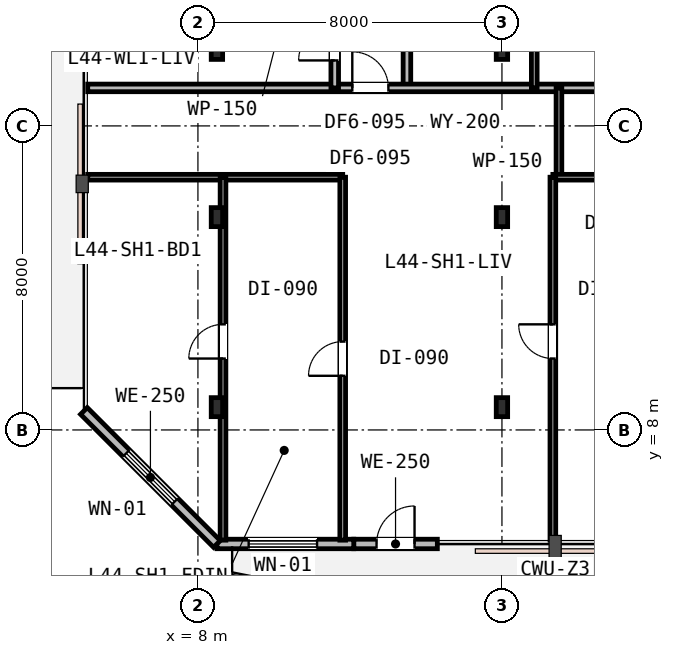
"""IFC4 building model, lengths in metres.
Left out: names, types, materials, properties, quantities, classifications, styles, units other than length and angle.
Written with IfcOpenShell. Run it as: python <this file> out.ifc"""

import sys

from ifc_helpers import new_model, si_unit, direction, frame, frame_2d, origin, origin_2d, place, context, subcontext, project, spatial, rectangle, i_section, extrude, element, fill, save


model = new_model("IFC4")
c1 = context("Model", 3, precision=1e-05, world=origin(), true_north=direction((0.0, 1.0)))
c2 = subcontext(c1, "Body", "Model", "MODEL_VIEW")
j1 = project(units=[si_unit("LENGTHUNIT", "METRE"), si_unit("PLANEANGLEUNIT", "RADIAN")], contexts=[c1])
p1 = place(None, origin())
s1 = spatial("IfcSite", under=j1, at=p1, CompositionType="ELEMENT")
p2 = place(p1, origin())
s2 = spatial("IfcBuilding", under=s1, at=p2, CompositionType="ELEMENT")
p3 = place(p2, frame((0.0, 0.0, 172.2)))
s3 = spatial("IfcBuildingStorey", under=s2, at=p3, CompositionType="ELEMENT", Elevation=172.2)
for number, where, z_axis, x_axis in (
    (1, (8.5, 8.6, 0.0), (0.0, 0.0, 1.0), (1.0, 0.0, 0.0)),
    (2, (16.0, 8.6, 0.0), (0.0, 0.0, 1.0), (1.0, 0.0, 0.0)),
    (3, (8.5, 13.6, 0.0), (0.0, 0.0, 1.0), (1.0, 0.0, 0.0)),
    (4, (16.0, 13.6, 0.0), (0.0, 0.0, 1.0), (1.0, 0.0, 0.0)),
    (5, (8.5, 18.0, 0.0), (0.0, 0.0, 1.0), (1.0, 0.0, 0.0)),
    (6, (16.0, 18.0, 0.0), (0.0, 0.0, 1.0), (1.0, 0.0, 0.0)),
):
    element("IfcColumn", number, at=place(p3, frame(where, z_axis=z_axis, x_axis=x_axis)), inside=s3, PredefinedType="COLUMN", context=c2, shape_type="SweptSolid", body=[
        extrude(i_section(OverallWidth=0.3, OverallDepth=0.5, WebThickness=0.015, FlangeThickness=0.028, FilletRadius=0.027, at=origin_2d()), origin(), (0.0, 0.0, 1.0), 3.6),
    ])
p4 = place(p3, frame((12.1, 5.0, 0.0), z_axis=(0.0, 0.0, 1.0), x_axis=(1.0, 0.0, 0.0)))
e7 = element("IfcWall", 7, at=p4, inside=s3, PredefinedType="STANDARD", context=c2, shape_type="SweptSolid", body=[
    extrude(rectangle(XDim=2.2, YDim=0.25, at=frame_2d((1.1, 0.0))), origin(), (0.0, 0.0, 1.0), 3.33),
])
p5 = place(p4, frame((0.6, 0.0, 0.0)))
e8 = element("IfcOpeningElement", 8, at=p5, cuts=e7, PredefinedType="OPENING", context=c2, shape_type="SweptSolid", body=[
    extrude(rectangle(XDim=1.0, YDim=2.15, at=frame_2d((0.5, 1.075))), frame((0.0, 0.135, 0.0), z_axis=(0.0, -1.0, 0.0), x_axis=(1.0, 0.0, 0.0)), (0.0, 0.0, 1.0), 0.27),
])
p6 = place(p3, frame((8.5, 5.0, 0.0), z_axis=(0.0, 0.0, 1.0), x_axis=(1.0, 0.0, 0.0)))
e9 = element("IfcWall", 9, at=p6, inside=s3, PredefinedType="STANDARD", context=c2, shape_type="SweptSolid", body=[
    extrude(rectangle(XDim=3.6, YDim=0.25, at=frame_2d((1.8, 0.0))), origin(), (0.0, 0.0, 1.0), 3.33),
])
p7 = place(p6, frame((0.835, 0.0, 0.75)))
e10 = element("IfcOpeningElement", 10, at=p7, cuts=e9, PredefinedType="OPENING", context=c2, shape_type="SweptSolid", body=[
    extrude(rectangle(XDim=1.8, YDim=1.85, at=frame_2d((0.9, 0.925))), frame((0.0, 0.135, 0.0), z_axis=(0.0, -1.0, 0.0), x_axis=(1.0, 0.0, 0.0)), (0.0, 0.0, 1.0), 0.27),
])
p8 = place(p3, frame((5.0, 8.5, 0.0), z_axis=(0.0, 0.0, 1.0), x_axis=(0.707106781187, -0.707106781187, 0.0)))
e11 = element("IfcWall", 11, at=p8, inside=s3, PredefinedType="STANDARD", context=c2, shape_type="SweptSolid", body=[
    extrude(rectangle(XDim=4.95, YDim=0.25, at=frame_2d((2.475, 0.0))), origin(), (0.0, 0.0, 1.0), 3.33),
])
p9 = place(p8, frame((1.575, 0.0, 0.75)))
e12 = element("IfcOpeningElement", 12, at=p9, cuts=e11, PredefinedType="OPENING", context=c2, shape_type="SweptSolid", body=[
    extrude(rectangle(XDim=1.8, YDim=1.85, at=frame_2d((0.9, 0.925))), frame((0.0, 0.135, 0.0), z_axis=(0.0, -1.0, 0.0), x_axis=(1.0, 0.0, 0.0)), (0.0, 0.0, 1.0), 0.27),
])
p10 = place(p3, frame((13.5, 17.0, 0.0), z_axis=(0.0, 0.0, 1.0), x_axis=(0.0, 1.0, 0.0)))
e13 = element("IfcWall", 13, at=p10, inside=s3, PredefinedType="PARTITIONING", context=c2, shape_type="SweptSolid", body=[
    extrude(rectangle(XDim=18.0, YDim=0.2, at=frame_2d((9.0, 0.0))), origin(), (0.0, 0.0, 1.0), 2.92),
])
p11 = place(p10, frame((15.425, 0.0, 0.0)))
e14 = element("IfcOpeningElement", 14, at=p11, cuts=e13, PredefinedType="OPENING", context=c2, shape_type="SweptSolid", body=[
    extrude(rectangle(XDim=0.95, YDim=2.15, at=frame_2d((0.475, 1.075))), frame((0.0, 0.11, 0.0), z_axis=(0.0, -1.0, 0.0), x_axis=(1.0, 0.0, 0.0)), (0.0, 0.0, 1.0), 0.22),
])
p12 = place(p10, frame((10.225, 0.0, 0.0)))
e15 = element("IfcOpeningElement", 15, at=p12, cuts=e13, PredefinedType="OPENING", context=c2, shape_type="SweptSolid", body=[
    extrude(rectangle(XDim=0.95, YDim=2.15, at=frame_2d((0.475, 1.075))), frame((0.0, 0.11, 0.0), z_axis=(0.0, -1.0, 0.0), x_axis=(1.0, 0.0, 0.0)), (0.0, 0.0, 1.0), 0.22),
])
p13 = place(p3, frame((5.1, 17.0, 0.0), z_axis=(0.0, 0.0, 1.0), x_axis=(1.0, 0.0, 0.0)))
e16 = element("IfcWall", 16, at=p13, inside=s3, PredefinedType="PARTITIONING", context=c2, shape_type="SweptSolid", body=[
    extrude(rectangle(XDim=18.8, YDim=0.2, at=frame_2d((9.4, 0.0))), origin(), (0.0, 0.0, 1.0), 2.92),
])
p14 = place(p13, frame((6.962, 0.0, 0.0)))
e17 = element("IfcOpeningElement", 17, at=p14, cuts=e16, PredefinedType="OPENING", context=c2, shape_type="SweptSolid", body=[
    extrude(rectangle(XDim=0.95, YDim=2.15, at=frame_2d((0.475, 1.075))), frame((0.0, 0.11, 0.0), z_axis=(0.0, -1.0, 0.0), x_axis=(1.0, 0.0, 0.0)), (0.0, 0.0, 1.0), 0.22),
])
p15 = place(p3, frame((11.6, 17.0, 0.0), z_axis=(0.0, 0.0, 1.0), x_axis=(0.0, 1.0, 0.0)))
e18 = element("IfcWall", 18, at=p15, inside=s3, PredefinedType="PARTITIONING", context=c2, shape_type="SweptSolid", body=[
    extrude(rectangle(XDim=11.6, YDim=0.2, at=frame_2d((5.8, 0.0))), origin(), (0.0, 0.0, 1.0), 2.92),
])
p16 = place(p15, frame((0.723, 0.0, 0.0)))
e19 = element("IfcOpeningElement", 19, at=p16, cuts=e18, PredefinedType="OPENING", context=c2, shape_type="SweptSolid", body=[
    extrude(rectangle(XDim=0.95, YDim=2.15, at=frame_2d((0.475, 1.075))), frame((0.0, 0.11, 0.0), z_axis=(0.0, -1.0, 0.0), x_axis=(1.0, 0.0, 0.0)), (0.0, 0.0, 1.0), 0.22),
])
p17 = place(p3, frame((16.85, 17.0, 0.0), z_axis=(0.0, 0.0, 1.0), x_axis=(0.0, 1.0, 0.0)))
e20 = element("IfcWall", 20, at=p17, inside=s3, PredefinedType="PARTITIONING", context=c2, shape_type="SweptSolid", body=[
    extrude(rectangle(XDim=9.8, YDim=0.15, at=frame_2d((4.9, 0.0))), origin(), (0.0, 0.0, 1.0), 2.92),
])
p18 = place(p17, frame((5.598, 0.0, 0.0)))
e21 = element("IfcOpeningElement", 21, at=p18, cuts=e20, PredefinedType="OPENING", context=c2, shape_type="SweptSolid", body=[
    extrude(rectangle(XDim=0.85, YDim=2.15, at=frame_2d((0.425, 1.075))), frame((0.0, 0.085, 0.0), z_axis=(0.0, -1.0, 0.0), x_axis=(1.0, 0.0, 0.0)), (0.0, 0.0, 1.0), 0.17),
])
p19 = place(p17, frame((8.496, 0.0, 0.0)))
e22 = element("IfcOpeningElement", 22, at=p19, cuts=e20, PredefinedType="OPENING", context=c2, shape_type="SweptSolid", body=[
    extrude(rectangle(XDim=0.85, YDim=2.15, at=frame_2d((0.425, 1.075))), frame((0.0, 0.085, 0.0), z_axis=(0.0, -1.0, 0.0), x_axis=(1.0, 0.0, 0.0)), (0.0, 0.0, 1.0), 0.17),
])
p20 = place(p17, frame((2.268, 0.0, 0.0)))
e23 = element("IfcOpeningElement", 23, at=p20, cuts=e20, PredefinedType="OPENING", context=c2, shape_type="SweptSolid", body=[
    extrude(rectangle(XDim=0.85, YDim=2.15, at=frame_2d((0.425, 1.075))), frame((0.0, 0.085, 0.0), z_axis=(0.0, -1.0, 0.0), x_axis=(1.0, 0.0, 0.0)), (0.0, 0.0, 1.0), 0.17),
])
p21 = place(p3, frame((17.5, 14.65, 0.0), z_axis=(0.0, 0.0, 1.0), x_axis=(0.0, 1.0, 0.0)))
e24 = element("IfcWall", 24, at=p21, inside=s3, PredefinedType="PARTITIONING", context=c2, shape_type="SweptSolid", body=[
    extrude(rectangle(XDim=2.35, YDim=0.15, at=frame_2d((1.175, 0.0))), origin(), (0.0, 0.0, 1.0), 3.33),
])
p22 = place(p3, frame((17.34, 14.65, 0.0), z_axis=(0.0, 0.0, 1.0), x_axis=(1.0, 0.0, 0.0)))
e25 = element("IfcWall", 25, at=p22, inside=s3, PredefinedType="PARTITIONING", context=c2, shape_type="SweptSolid", body=[
    extrude(rectangle(XDim=6.56, YDim=0.15, at=frame_2d((3.28, 0.0))), origin(), (0.0, 0.0, 1.0), 3.02),
])
p23 = place(p22, frame((1.335, 0.0, 0.0)))
e26 = element("IfcOpeningElement", 26, at=p23, cuts=e25, PredefinedType="OPENING", context=c2, shape_type="SweptSolid", body=[
    extrude(rectangle(XDim=0.85, YDim=2.15, at=frame_2d((0.425, 1.075))), frame((0.0, 0.085, 0.0), z_axis=(0.0, -1.0, 0.0), x_axis=(1.0, 0.0, 0.0)), (0.0, 0.0, 1.0), 0.17),
])
p24 = place(p22, frame((3.93, 0.0, 0.0)))
e27 = element("IfcOpeningElement", 27, at=p24, cuts=e25, PredefinedType="OPENING", context=c2, shape_type="SweptSolid", body=[
    extrude(rectangle(XDim=0.85, YDim=2.15, at=frame_2d((0.425, 1.075))), frame((0.0, 0.085, 0.0), z_axis=(0.0, -1.0, 0.0), x_axis=(1.0, 0.0, 0.0)), (0.0, 0.0, 1.0), 0.17),
])
p25 = place(p3, frame((5.1, 14.65, 0.0), z_axis=(0.0, 0.0, 1.0), x_axis=(1.0, 0.0, 0.0)))
e28 = element("IfcWall", 28, at=p25, inside=s3, PredefinedType="PARTITIONING", context=c2, shape_type="SweptSolid", body=[
    extrude(rectangle(XDim=6.71, YDim=0.15, at=frame_2d((3.355, 0.0))), origin(), (0.0, 0.0, 1.0), 2.92),
])
p26 = place(p3, frame((8.66, 5.1, 0.0), z_axis=(0.0, 0.0, 1.0), x_axis=(0.0, 1.0, 0.0)))
e29 = element("IfcWall", 29, at=p26, inside=s3, PredefinedType="PARTITIONING", context=c2, shape_type="SweptSolid", body=[
    extrude(rectangle(XDim=9.55, YDim=0.15, at=frame_2d((4.775, 0.0))), origin(), (0.0, 0.0, 1.0), 2.92),
])
p27 = place(p26, frame((4.779, 0.0, 0.0)))
e30 = element("IfcOpeningElement", 30, at=p27, cuts=e29, PredefinedType="OPENING", context=c2, shape_type="SweptSolid", body=[
    extrude(rectangle(XDim=0.9, YDim=2.15, at=frame_2d((0.45, 1.075))), frame((0.0, 0.085, 0.0), z_axis=(0.0, -1.0, 0.0), x_axis=(1.0, 0.0, 0.0)), (0.0, 0.0, 1.0), 0.17),
])
p28 = place(p3, frame((17.34, 5.1, 0.0), z_axis=(0.0, 0.0, 1.0), x_axis=(0.0, 1.0, 0.0)))
e31 = element("IfcWall", 31, at=p28, inside=s3, PredefinedType="PARTITIONING", context=c2, shape_type="SweptSolid", body=[
    extrude(rectangle(XDim=9.55, YDim=0.15, at=frame_2d((4.775, 0.0))), origin(), (0.0, 0.0, 1.0), 2.92),
])
p29 = place(p28, frame((4.779, 0.0, 0.0)))
e32 = element("IfcOpeningElement", 32, at=p29, cuts=e31, PredefinedType="OPENING", context=c2, shape_type="SweptSolid", body=[
    extrude(rectangle(XDim=0.9, YDim=2.15, at=frame_2d((0.45, 1.075))), frame((0.0, 0.085, 0.0), z_axis=(0.0, -1.0, 0.0), x_axis=(1.0, 0.0, 0.0)), (0.0, 0.0, 1.0), 0.17),
])
p30 = place(p3, frame((11.81, 5.1, 0.0), z_axis=(0.0, 0.0, 1.0), x_axis=(0.0, 1.0, 0.0)))
e33 = element("IfcWall", 33, at=p30, inside=s3, PredefinedType="PARTITIONING", context=c2, shape_type="SweptSolid", body=[
    extrude(rectangle(XDim=9.55, YDim=0.15, at=frame_2d((4.775, 0.0))), origin(), (0.0, 0.0, 1.0), 2.92),
])
p31 = place(p30, frame((4.325, 0.0, 0.0)))
e34 = element("IfcOpeningElement", 34, at=p31, cuts=e33, PredefinedType="OPENING", context=c2, shape_type="SweptSolid", body=[
    extrude(rectangle(XDim=0.9, YDim=2.15, at=frame_2d((0.45, 1.075))), frame((0.0, 0.085, 0.0), z_axis=(0.0, -1.0, 0.0), x_axis=(1.0, 0.0, 0.0)), (0.0, 0.0, 1.0), 0.17),
])
p32 = place(p5, origin())
e35 = element("IfcDoor", 35, at=p32, inside=s3, OperationType="SINGLE_SWING_RIGHT", PredefinedType="DOOR", context=c2, shape_type="SweptSolid", body=[
    extrude(rectangle(XDim=1.0, YDim=2.15, at=frame_2d((0.5, 1.075))), frame((0.0, 0.025, 0.0), z_axis=(0.0, -1.0, 0.0), x_axis=(1.0, 0.0, 0.0)), (0.0, 0.0, 1.0), 0.05),
])
fill(e8, e35)
p33 = place(p7, origin())
e36 = element("IfcWindow", 36, at=p33, inside=s3, PartitioningType="SINGLE_PANEL", PredefinedType="WINDOW", context=c2, shape_type="SweptSolid", body=[
    extrude(rectangle(XDim=1.8, YDim=1.85, at=frame_2d((0.9, 0.925))), frame((0.0, 0.03, 0.0), z_axis=(0.0, -1.0, 0.0), x_axis=(1.0, 0.0, 0.0)), (0.0, 0.0, 1.0), 0.06),
])
fill(e10, e36)
p34 = place(p9, origin())
e37 = element("IfcWindow", 37, at=p34, inside=s3, PartitioningType="SINGLE_PANEL", PredefinedType="WINDOW", context=c2, shape_type="SweptSolid", body=[
    extrude(rectangle(XDim=1.8, YDim=1.85, at=frame_2d((0.9, 0.925))), frame((0.0, 0.03, 0.0), z_axis=(0.0, -1.0, 0.0), x_axis=(1.0, 0.0, 0.0)), (0.0, 0.0, 1.0), 0.06),
])
fill(e12, e37)
p35 = place(p16, origin())
e38 = element("IfcDoor", 38, at=p35, inside=s3, OperationType="SINGLE_SWING_LEFT", PredefinedType="DOOR", context=c2, shape_type="SweptSolid", body=[
    extrude(rectangle(XDim=0.95, YDim=2.15, at=frame_2d((0.475, 1.075))), frame((0.0, 0.025, 0.0), z_axis=(0.0, -1.0, 0.0), x_axis=(1.0, 0.0, 0.0)), (0.0, 0.0, 1.0), 0.05),
])
fill(e19, e38)
p36 = place(p14, origin())
e39 = element("IfcDoor", 39, at=p36, inside=s3, OperationType="SINGLE_SWING_LEFT", PredefinedType="DOOR", context=c2, shape_type="SweptSolid", body=[
    extrude(rectangle(XDim=0.95, YDim=2.15, at=frame_2d((0.475, 1.075))), frame((0.0, 0.025, 0.0), z_axis=(0.0, -1.0, 0.0), x_axis=(1.0, 0.0, 0.0)), (0.0, 0.0, 1.0), 0.05),
])
fill(e17, e39)
p37 = place(p27, origin())
e40 = element("IfcDoor", 40, at=p37, inside=s3, OperationType="SINGLE_SWING_LEFT", PredefinedType="DOOR", context=c2, shape_type="SweptSolid", body=[
    extrude(rectangle(XDim=0.9, YDim=2.15, at=frame_2d((0.45, 1.075))), frame((0.0, 0.025, 0.0), z_axis=(0.0, -1.0, 0.0), x_axis=(1.0, 0.0, 0.0)), (0.0, 0.0, 1.0), 0.05),
])
fill(e30, e40)
p38 = place(p29, origin())
e41 = element("IfcDoor", 41, at=p38, inside=s3, OperationType="SINGLE_SWING_RIGHT", PredefinedType="DOOR", context=c2, shape_type="SweptSolid", body=[
    extrude(rectangle(XDim=0.9, YDim=2.15, at=frame_2d((0.45, 1.075))), frame((0.0, 0.025, 0.0), z_axis=(0.0, -1.0, 0.0), x_axis=(1.0, 0.0, 0.0)), (0.0, 0.0, 1.0), 0.05),
])
fill(e32, e41)
p39 = place(p31, origin())
e42 = element("IfcDoor", 42, at=p39, inside=s3, OperationType="SINGLE_SWING_LEFT", PredefinedType="DOOR", context=c2, shape_type="SweptSolid", body=[
    extrude(rectangle(XDim=0.9, YDim=2.15, at=frame_2d((0.45, 1.075))), frame((0.0, 0.025, 0.0), z_axis=(0.0, -1.0, 0.0), x_axis=(1.0, 0.0, 0.0)), (0.0, 0.0, 1.0), 0.05),
])
fill(e34, e42)
save(model, sys.argv[1])
